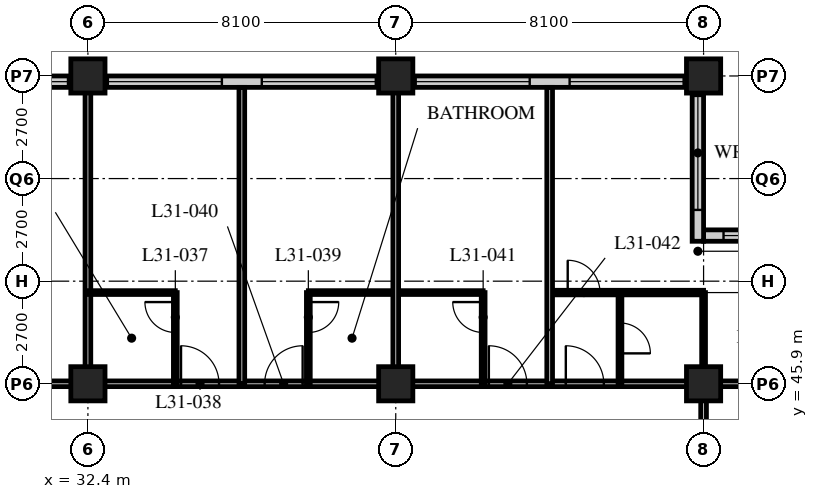
"""IFC4 building model, lengths in metres.
Left out: names, types, materials, properties, quantities, classifications, styles, units other than length and angle.
Written with IfcOpenShell. Run it as: python <this file> out.ifc"""

import sys

from ifc_helpers import new_model, si_unit, direction, frame, frame_2d, origin, origin_2d, place, context, subcontext, project, spatial, rectangle, hollow_rectangle, extrude, element, fill, save


model = new_model("IFC4")
c1 = context("Model", 3, precision=1e-05, world=origin(), true_north=direction((0.0, 1.0)))
c2 = subcontext(c1, "Body", "Model", "MODEL_VIEW")
j1 = project(units=[si_unit("LENGTHUNIT", "METRE"), si_unit("PLANEANGLEUNIT", "RADIAN")], contexts=[c1])
p1 = place(None, origin())
s1 = spatial("IfcSite", under=j1, at=p1, CompositionType="ELEMENT")
p2 = place(p1, origin())
s2 = spatial("IfcBuilding", under=s1, at=p2, CompositionType="ELEMENT")
p3 = place(p2, frame((0.0, 0.0, 123.8)))
s3 = spatial("IfcBuildingStorey", under=s2, at=p3, CompositionType="ELEMENT", Elevation=123.8)
for number, where, z_axis, x_axis in (
    (1, (32.4, 45.9, 0.0), (0.0, 0.0, 1.0), (1.0, 0.0, 0.0)),
    (2, (32.4, 54.0, 0.0), (0.0, 0.0, 1.0), (1.0, 0.0, 0.0)),
    (3, (40.5, 45.9, 0.0), (0.0, 0.0, 1.0), (1.0, 0.0, 0.0)),
    (4, (40.5, 54.0, 0.0), (0.0, 0.0, 1.0), (1.0, 0.0, 0.0)),
    (5, (48.6, 45.9, 0.0), (0.0, 0.0, 1.0), (1.0, 0.0, 0.0)),
    (6, (48.6, 54.0, 0.0), (0.0, 0.0, 1.0), (1.0, 0.0, 0.0)),
):
    element("IfcColumn", number, at=place(p3, frame(where, z_axis=z_axis, x_axis=x_axis)), inside=s3, PredefinedType="COLUMN", context=c2, shape_type="SweptSolid", body=[
        extrude(hollow_rectangle(XDim=0.9, YDim=0.9, WallThickness=0.09, at=origin_2d()), origin(), (0.0, 0.0, 1.0), 3.4),
    ])
p4 = place(p3, frame((52.35, 49.8, 0.0), z_axis=(0.0, 0.0, 1.0), x_axis=(-1.0, 0.0, 0.0)))
e7 = element("IfcWall", 7, at=p4, inside=s3, PredefinedType="SOLIDWALL", context=c2, shape_type="SweptSolid", body=[
    extrude(rectangle(XDim=3.75, YDim=0.3, at=frame_2d((1.875, 0.0))), origin(), (0.0, 0.0, 1.0), 3.19),
])
p5 = place(p4, frame((0.225, 0.0, 0.9)))
e8 = element("IfcOpeningElement", 8, at=p5, cuts=e7, PredefinedType="OPENING", context=c2, shape_type="SweptSolid", body=[
    extrude(rectangle(XDim=3.0, YDim=1.5, at=frame_2d((1.5, 0.75))), frame((0.0, 0.16, 0.0), z_axis=(0.0, -1.0, 0.0), x_axis=(1.0, 0.0, 0.0)), (0.0, 0.0, 1.0), 0.32),
])
p6 = place(p3, frame((48.45, 49.65, 0.0), z_axis=(0.0, 0.0, 1.0), x_axis=(0.0, 1.0, 0.0)))
e9 = element("IfcWall", 9, at=p6, inside=s3, PredefinedType="SOLIDWALL", context=c2, shape_type="SweptSolid", body=[
    extrude(rectangle(XDim=4.35, YDim=0.3, at=frame_2d((2.175, 0.0))), origin(), (0.0, 0.0, 1.0), 3.19),
])
p7 = place(p6, frame((0.825, 0.0, 0.9)))
e10 = element("IfcOpeningElement", 10, at=p7, cuts=e9, PredefinedType="OPENING", context=c2, shape_type="SweptSolid", body=[
    extrude(rectangle(XDim=3.0, YDim=1.5, at=frame_2d((1.5, 0.75))), frame((0.0, 0.16, 0.0), z_axis=(0.0, -1.0, 0.0), x_axis=(1.0, 0.0, 0.0)), (0.0, 0.0, 1.0), 0.32),
])
p8 = place(p3, frame((48.3, 53.85, 0.0), z_axis=(0.0, 0.0, 1.0), x_axis=(-1.0, 0.0, 0.0)))
e11 = element("IfcWall", 11, at=p8, inside=s3, PredefinedType="SOLIDWALL", context=c2, shape_type="SweptSolid", body=[
    extrude(rectangle(XDim=40.2, YDim=0.3, at=frame_2d((20.1, 0.0))), origin(), (0.0, 0.0, 1.0), 3.19),
])
p9 = place(p8, frame((0.225, 0.0, 0.9)))
e12 = element("IfcOpeningElement", 12, at=p9, cuts=e11, PredefinedType="OPENING", context=c2, shape_type="SweptSolid", body=[
    extrude(rectangle(XDim=3.0, YDim=2.0, at=frame_2d((1.5, 1.0))), frame((0.0, 0.16, 0.0), z_axis=(0.0, -1.0, 0.0), x_axis=(1.0, 0.0, 0.0)), (0.0, 0.0, 1.0), 0.32),
])
p10 = place(p8, frame((4.275, 0.0, 0.9)))
e13 = element("IfcOpeningElement", 13, at=p10, cuts=e11, PredefinedType="OPENING", context=c2, shape_type="SweptSolid", body=[
    extrude(rectangle(XDim=3.0, YDim=2.0, at=frame_2d((1.5, 1.0))), frame((0.0, 0.16, 0.0), z_axis=(0.0, -1.0, 0.0), x_axis=(1.0, 0.0, 0.0)), (0.0, 0.0, 1.0), 0.32),
])
p11 = place(p8, frame((8.325, 0.0, 0.9)))
e14 = element("IfcOpeningElement", 14, at=p11, cuts=e11, PredefinedType="OPENING", context=c2, shape_type="SweptSolid", body=[
    extrude(rectangle(XDim=3.0, YDim=2.0, at=frame_2d((1.5, 1.0))), frame((0.0, 0.16, 0.0), z_axis=(0.0, -1.0, 0.0), x_axis=(1.0, 0.0, 0.0)), (0.0, 0.0, 1.0), 0.32),
])
p12 = place(p8, frame((12.375, 0.0, 0.9)))
e15 = element("IfcOpeningElement", 15, at=p12, cuts=e11, PredefinedType="OPENING", context=c2, shape_type="SweptSolid", body=[
    extrude(rectangle(XDim=3.0, YDim=2.0, at=frame_2d((1.5, 1.0))), frame((0.0, 0.16, 0.0), z_axis=(0.0, -1.0, 0.0), x_axis=(1.0, 0.0, 0.0)), (0.0, 0.0, 1.0), 0.32),
])
p13 = place(p8, frame((16.425, 0.0, 0.9)))
e16 = element("IfcOpeningElement", 16, at=p13, cuts=e11, PredefinedType="OPENING", context=c2, shape_type="SweptSolid", body=[
    extrude(rectangle(XDim=3.0, YDim=2.0, at=frame_2d((1.5, 1.0))), frame((0.0, 0.16, 0.0), z_axis=(0.0, -1.0, 0.0), x_axis=(1.0, 0.0, 0.0)), (0.0, 0.0, 1.0), 0.32),
])
p14 = place(p8, frame((20.475, 0.0, 0.9)))
e17 = element("IfcOpeningElement", 17, at=p14, cuts=e11, PredefinedType="OPENING", context=c2, shape_type="SweptSolid", body=[
    extrude(rectangle(XDim=3.0, YDim=2.0, at=frame_2d((1.5, 1.0))), frame((0.0, 0.16, 0.0), z_axis=(0.0, -1.0, 0.0), x_axis=(1.0, 0.0, 0.0)), (0.0, 0.0, 1.0), 0.32),
])
p15 = place(p8, frame((24.525, 0.0, 0.9)))
e18 = element("IfcOpeningElement", 18, at=p15, cuts=e11, PredefinedType="OPENING", context=c2, shape_type="SweptSolid", body=[
    extrude(rectangle(XDim=3.0, YDim=2.0, at=frame_2d((1.5, 1.0))), frame((0.0, 0.16, 0.0), z_axis=(0.0, -1.0, 0.0), x_axis=(1.0, 0.0, 0.0)), (0.0, 0.0, 1.0), 0.32),
])
p16 = place(p8, frame((28.575, 0.0, 0.9)))
e19 = element("IfcOpeningElement", 19, at=p16, cuts=e11, PredefinedType="OPENING", context=c2, shape_type="SweptSolid", body=[
    extrude(rectangle(XDim=3.0, YDim=2.0, at=frame_2d((1.5, 1.0))), frame((0.0, 0.16, 0.0), z_axis=(0.0, -1.0, 0.0), x_axis=(1.0, 0.0, 0.0)), (0.0, 0.0, 1.0), 0.32),
])
p17 = place(p8, frame((32.625, 0.0, 0.9)))
e20 = element("IfcOpeningElement", 20, at=p17, cuts=e11, PredefinedType="OPENING", context=c2, shape_type="SweptSolid", body=[
    extrude(rectangle(XDim=3.0, YDim=2.0, at=frame_2d((1.5, 1.0))), frame((0.0, 0.16, 0.0), z_axis=(0.0, -1.0, 0.0), x_axis=(1.0, 0.0, 0.0)), (0.0, 0.0, 1.0), 0.32),
])
p18 = place(p8, frame((36.675, 0.0, 0.9)))
e21 = element("IfcOpeningElement", 21, at=p18, cuts=e11, PredefinedType="OPENING", context=c2, shape_type="SweptSolid", body=[
    extrude(rectangle(XDim=3.0, YDim=2.0, at=frame_2d((1.5, 1.0))), frame((0.0, 0.16, 0.0), z_axis=(0.0, -1.0, 0.0), x_axis=(1.0, 0.0, 0.0)), (0.0, 0.0, 1.0), 0.32),
])
p19 = place(p3, frame((8.1, 45.9, 0.0), z_axis=(0.0, 0.0, 1.0), x_axis=(1.0, 0.0, 0.0)))
e22 = element("IfcWall", 22, at=p19, inside=s3, PredefinedType="PARTITIONING", context=c2, shape_type="SweptSolid", body=[
    extrude(rectangle(XDim=40.5, YDim=0.15, at=frame_2d((20.25, 0.0))), origin(), (0.0, 0.0, 1.0), 2.578),
])
p20 = place(p19, frame((9.625, 0.0, 0.0)))
e23 = element("IfcOpeningElement", 23, at=p20, cuts=e22, PredefinedType="OPENING", context=c2, shape_type="SweptSolid", body=[
    extrude(rectangle(XDim=1.0, YDim=2.1, at=frame_2d((0.5, 1.05))), frame((0.0, 0.085, 0.0), z_axis=(0.0, -1.0, 0.0), x_axis=(1.0, 0.0, 0.0)), (0.0, 0.0, 1.0), 0.17),
])
p21 = place(p19, frame((21.65, 0.0, 0.0)))
e24 = element("IfcOpeningElement", 24, at=p21, cuts=e22, PredefinedType="OPENING", context=c2, shape_type="SweptSolid", body=[
    extrude(rectangle(XDim=1.0, YDim=2.1, at=frame_2d((0.5, 1.05))), frame((0.0, 0.085, 0.0), z_axis=(0.0, -1.0, 0.0), x_axis=(1.0, 0.0, 0.0)), (0.0, 0.0, 1.0), 0.17),
])
p22 = place(p19, frame((26.75, 0.0, 0.0)))
e25 = element("IfcOpeningElement", 25, at=p22, cuts=e22, PredefinedType="OPENING", context=c2, shape_type="SweptSolid", body=[
    extrude(rectangle(XDim=1.0, YDim=2.1, at=frame_2d((0.5, 1.05))), frame((0.0, 0.085, 0.0), z_axis=(0.0, -1.0, 0.0), x_axis=(1.0, 0.0, 0.0)), (0.0, 0.0, 1.0), 0.17),
])
p23 = place(p19, frame((28.95, 0.0, 0.0)))
e26 = element("IfcOpeningElement", 26, at=p23, cuts=e22, PredefinedType="OPENING", context=c2, shape_type="SweptSolid", body=[
    extrude(rectangle(XDim=1.0, YDim=2.1, at=frame_2d((0.5, 1.05))), frame((0.0, 0.085, 0.0), z_axis=(0.0, -1.0, 0.0), x_axis=(1.0, 0.0, 0.0)), (0.0, 0.0, 1.0), 0.17),
])
p24 = place(p19, frame((34.85, 0.0, 0.0)))
e27 = element("IfcOpeningElement", 27, at=p24, cuts=e22, PredefinedType="OPENING", context=c2, shape_type="SweptSolid", body=[
    extrude(rectangle(XDim=1.0, YDim=2.1, at=frame_2d((0.5, 1.05))), frame((0.0, 0.085, 0.0), z_axis=(0.0, -1.0, 0.0), x_axis=(1.0, 0.0, 0.0)), (0.0, 0.0, 1.0), 0.17),
])
p25 = place(p19, frame((36.875, 0.0, 0.0)))
e28 = element("IfcOpeningElement", 28, at=p25, cuts=e22, PredefinedType="OPENING", context=c2, shape_type="SweptSolid", body=[
    extrude(rectangle(XDim=1.0, YDim=2.1, at=frame_2d((0.5, 1.05))), frame((0.0, 0.085, 0.0), z_axis=(0.0, -1.0, 0.0), x_axis=(1.0, 0.0, 0.0)), (0.0, 0.0, 1.0), 0.17),
])
p26 = place(p19, frame((2.625, 0.0, 0.0)))
e29 = element("IfcOpeningElement", 29, at=p26, cuts=e22, PredefinedType="OPENING", context=c2, shape_type="SweptSolid", body=[
    extrude(rectangle(XDim=1.0, YDim=2.1, at=frame_2d((0.5, 1.05))), frame((0.0, 0.085, 0.0), z_axis=(0.0, -1.0, 0.0), x_axis=(1.0, 0.0, 0.0)), (0.0, 0.0, 1.0), 0.17),
])
p27 = place(p3, frame((48.6, 21.6, 0.0), z_axis=(0.0, 0.0, 1.0), x_axis=(0.0, 1.0, 0.0)))
e30 = element("IfcWall", 30, at=p27, inside=s3, PredefinedType="PARTITIONING", context=c2, shape_type="SweptSolid", body=[
    extrude(rectangle(XDim=24.3, YDim=0.15, at=frame_2d((12.15, 0.0))), origin(), (0.0, 0.0, 1.0), 2.578),
])
p28 = place(p27, frame((2.75, 0.0, 0.0)))
e31 = element("IfcOpeningElement", 31, at=p28, cuts=e30, PredefinedType="OPENING", context=c2, shape_type="SweptSolid", body=[
    extrude(rectangle(XDim=1.0, YDim=2.1, at=frame_2d((0.5, 1.05))), frame((0.0, 0.085, 0.0), z_axis=(0.0, -1.0, 0.0), x_axis=(1.0, 0.0, 0.0)), (0.0, 0.0, 1.0), 0.17),
])
p29 = place(p27, frame((4.65, 0.0, 0.0)))
e32 = element("IfcOpeningElement", 32, at=p29, cuts=e30, PredefinedType="OPENING", context=c2, shape_type="SweptSolid", body=[
    extrude(rectangle(XDim=1.0, YDim=2.1, at=frame_2d((0.5, 1.05))), frame((0.0, 0.085, 0.0), z_axis=(0.0, -1.0, 0.0), x_axis=(1.0, 0.0, 0.0)), (0.0, 0.0, 1.0), 0.17),
])
p30 = place(p27, frame((10.0, 0.0, 0.0)))
e33 = element("IfcOpeningElement", 33, at=p30, cuts=e30, PredefinedType="OPENING", context=c2, shape_type="SweptSolid", body=[
    extrude(rectangle(XDim=1.0, YDim=2.1, at=frame_2d((0.5, 1.05))), frame((0.0, 0.085, 0.0), z_axis=(0.0, -1.0, 0.0), x_axis=(1.0, 0.0, 0.0)), (0.0, 0.0, 1.0), 0.17),
])
p31 = place(p27, frame((18.1, 0.0, 0.0)))
e34 = element("IfcOpeningElement", 34, at=p31, cuts=e30, PredefinedType="OPENING", context=c2, shape_type="SweptSolid", body=[
    extrude(rectangle(XDim=1.0, YDim=2.1, at=frame_2d((0.5, 1.05))), frame((0.0, 0.085, 0.0), z_axis=(0.0, -1.0, 0.0), x_axis=(1.0, 0.0, 0.0)), (0.0, 0.0, 1.0), 0.17),
])
p32 = place(p3, frame((32.4, 45.9, 0.0), z_axis=(0.0, 0.0, 1.0), x_axis=(0.0, 1.0, 0.0)))
e35 = element("IfcWall", 35, at=p32, inside=s3, PredefinedType="PARTITIONING", context=c2, shape_type="SweptSolid", body=[
    extrude(rectangle(XDim=7.8, YDim=0.15, at=frame_2d((3.9, 0.0))), origin(), (0.0, 0.0, 1.0), 2.578),
])
p33 = place(p3, frame((32.4, 48.3, 0.0), z_axis=(0.0, 0.0, 1.0), x_axis=(1.0, 0.0, 0.0)))
e36 = element("IfcWall", 36, at=p33, inside=s3, PredefinedType="PARTITIONING", context=c2, shape_type="SweptSolid", body=[
    extrude(rectangle(XDim=2.3, YDim=0.1, at=frame_2d((1.15, 0.0))), origin(), (0.0, 0.0, 1.0), 3.19),
])
p34 = place(p3, frame((34.7, 45.9, 0.0), z_axis=(0.0, 0.0, 1.0), x_axis=(0.0, 1.0, 0.0)))
e37 = element("IfcWall", 37, at=p34, inside=s3, PredefinedType="PARTITIONING", context=c2, shape_type="SweptSolid", body=[
    extrude(rectangle(XDim=2.4, YDim=0.1, at=frame_2d((1.2, 0.0))), origin(), (0.0, 0.0, 1.0), 3.19),
])
p35 = place(p34, frame((1.35, 0.0, 0.0)))
e38 = element("IfcOpeningElement", 38, at=p35, cuts=e37, PredefinedType="OPENING", context=c2, shape_type="SweptSolid", body=[
    extrude(rectangle(XDim=0.8, YDim=2.1, at=frame_2d((0.4, 1.05))), frame((0.0, 0.06, 0.0), z_axis=(0.0, -1.0, 0.0), x_axis=(1.0, 0.0, 0.0)), (0.0, 0.0, 1.0), 0.12),
])
p36 = place(p3, frame((36.45, 45.9, 0.0), z_axis=(0.0, 0.0, 1.0), x_axis=(0.0, 1.0, 0.0)))
e39 = element("IfcWall", 39, at=p36, inside=s3, PredefinedType="PARTITIONING", context=c2, shape_type="SweptSolid", body=[
    extrude(rectangle(XDim=7.8, YDim=0.15, at=frame_2d((3.9, 0.0))), origin(), (0.0, 0.0, 1.0), 3.19),
])
p37 = place(p3, frame((38.2, 48.3, 0.0), z_axis=(0.0, 0.0, 1.0), x_axis=(1.0, 0.0, 0.0)))
e40 = element("IfcWall", 40, at=p37, inside=s3, PredefinedType="PARTITIONING", context=c2, shape_type="SweptSolid", body=[
    extrude(rectangle(XDim=4.6, YDim=0.1, at=frame_2d((2.3, 0.0))), origin(), (0.0, 0.0, 1.0), 3.19),
])
p38 = place(p3, frame((38.2, 45.9, 0.0), z_axis=(0.0, 0.0, 1.0), x_axis=(0.0, 1.0, 0.0)))
e41 = element("IfcWall", 41, at=p38, inside=s3, PredefinedType="PARTITIONING", context=c2, shape_type="SweptSolid", body=[
    extrude(rectangle(XDim=2.4, YDim=0.1, at=frame_2d((1.2, 0.0))), origin(), (0.0, 0.0, 1.0), 3.19),
])
p39 = place(p38, frame((1.35, 0.0, 0.0)))
e42 = element("IfcOpeningElement", 42, at=p39, cuts=e41, PredefinedType="OPENING", context=c2, shape_type="SweptSolid", body=[
    extrude(rectangle(XDim=0.8, YDim=2.1, at=frame_2d((0.4, 1.05))), frame((0.0, 0.06, 0.0), z_axis=(0.0, -1.0, 0.0), x_axis=(1.0, 0.0, 0.0)), (0.0, 0.0, 1.0), 0.12),
])
p40 = place(p3, frame((40.5, 45.9, 0.0), z_axis=(0.0, 0.0, 1.0), x_axis=(0.0, 1.0, 0.0)))
e43 = element("IfcWall", 43, at=p40, inside=s3, PredefinedType="PARTITIONING", context=c2, shape_type="SweptSolid", body=[
    extrude(rectangle(XDim=7.8, YDim=0.15, at=frame_2d((3.9, 0.0))), origin(), (0.0, 0.0, 1.0), 2.578),
])
p41 = place(p3, frame((42.8, 45.9, 0.0), z_axis=(0.0, 0.0, 1.0), x_axis=(0.0, 1.0, 0.0)))
e44 = element("IfcWall", 44, at=p41, inside=s3, PredefinedType="PARTITIONING", context=c2, shape_type="SweptSolid", body=[
    extrude(rectangle(XDim=2.4, YDim=0.1, at=frame_2d((1.2, 0.0))), origin(), (0.0, 0.0, 1.0), 3.19),
])
p42 = place(p41, frame((1.35, 0.0, 0.0)))
e45 = element("IfcOpeningElement", 45, at=p42, cuts=e44, PredefinedType="OPENING", context=c2, shape_type="SweptSolid", body=[
    extrude(rectangle(XDim=0.8, YDim=2.1, at=frame_2d((0.4, 1.05))), frame((0.0, 0.06, 0.0), z_axis=(0.0, -1.0, 0.0), x_axis=(1.0, 0.0, 0.0)), (0.0, 0.0, 1.0), 0.12),
])
p43 = place(p3, frame((44.55, 48.3, 0.0), z_axis=(0.0, 0.0, 1.0), x_axis=(1.0, 0.0, 0.0)))
e46 = element("IfcWall", 46, at=p43, inside=s3, PredefinedType="PARTITIONING", context=c2, shape_type="SweptSolid", body=[
    extrude(rectangle(XDim=4.05, YDim=0.12, at=frame_2d((2.025, 0.0))), origin(), (0.0, 0.0, 1.0), 3.19),
])
p44 = place(p43, frame((0.475, 0.0, 0.0)))
e47 = element("IfcOpeningElement", 47, at=p44, cuts=e46, PredefinedType="OPENING", context=c2, shape_type="SweptSolid", body=[
    extrude(rectangle(XDim=0.85, YDim=2.1, at=frame_2d((0.425, 1.05))), frame((0.0, 0.07, 0.0), z_axis=(0.0, -1.0, 0.0), x_axis=(1.0, 0.0, 0.0)), (0.0, 0.0, 1.0), 0.14),
])
p45 = place(p3, frame((46.4, 45.9, 0.0), z_axis=(0.0, 0.0, 1.0), x_axis=(0.0, 1.0, 0.0)))
e48 = element("IfcWall", 48, at=p45, inside=s3, PredefinedType="PARTITIONING", context=c2, shape_type="SweptSolid", body=[
    extrude(rectangle(XDim=2.4, YDim=0.1, at=frame_2d((1.2, 0.0))), origin(), (0.0, 0.0, 1.0), 3.19),
])
p46 = place(p45, frame((0.8, 0.0, 0.0)))
e49 = element("IfcOpeningElement", 49, at=p46, cuts=e48, PredefinedType="OPENING", context=c2, shape_type="SweptSolid", body=[
    extrude(rectangle(XDim=0.8, YDim=2.1, at=frame_2d((0.4, 1.05))), frame((0.0, 0.06, 0.0), z_axis=(0.0, -1.0, 0.0), x_axis=(1.0, 0.0, 0.0)), (0.0, 0.0, 1.0), 0.12),
])
p47 = place(p3, frame((48.6, 45.9, 0.0), z_axis=(0.0, 0.0, 1.0), x_axis=(0.0, 1.0, 0.0)))
e50 = element("IfcWall", 50, at=p47, inside=s3, PredefinedType="PARTITIONING", context=c2, shape_type="SweptSolid", body=[
    extrude(rectangle(XDim=2.4, YDim=0.1, at=frame_2d((1.2, 0.0))), origin(), (0.0, 0.0, 1.0), 2.578),
])
p48 = place(p3, frame((48.6, 45.9, 0.0), z_axis=(0.0, 0.0, 1.0), x_axis=(1.0, 0.0, 0.0)))
e51 = element("IfcWall", 51, at=p48, inside=s3, PredefinedType="PARTITIONING", context=c2, shape_type="SweptSolid", body=[
    extrude(rectangle(XDim=3.75, YDim=0.15, at=frame_2d((1.875, 0.0))), origin(), (0.0, 0.0, 1.0), 2.578),
])
p49 = place(p3, frame((44.55, 45.9, 0.0), z_axis=(0.0, 0.0, 1.0), x_axis=(0.0, 1.0, 0.0)))
e52 = element("IfcWall", 52, at=p49, inside=s3, PredefinedType="PARTITIONING", context=c2, shape_type="SweptSolid", body=[
    extrude(rectangle(XDim=7.8, YDim=0.15, at=frame_2d((3.9, 0.0))), origin(), (0.0, 0.0, 1.0), 3.19),
])
p50 = place(p5, origin())
e53 = element("IfcWindow", 53, at=p50, inside=s3, PartitioningType="SINGLE_PANEL", PredefinedType="WINDOW", context=c2, shape_type="SweptSolid", body=[
    extrude(rectangle(XDim=3.0, YDim=1.5, at=frame_2d((1.5, 0.75))), frame((0.0, 0.03, 0.0), z_axis=(0.0, -1.0, 0.0), x_axis=(1.0, 0.0, 0.0)), (0.0, 0.0, 1.0), 0.06),
])
fill(e8, e53)
p51 = place(p7, origin())
e54 = element("IfcWindow", 54, at=p51, inside=s3, PartitioningType="SINGLE_PANEL", PredefinedType="WINDOW", context=c2, shape_type="SweptSolid", body=[
    extrude(rectangle(XDim=3.0, YDim=1.5, at=frame_2d((1.5, 0.75))), frame((0.0, 0.03, 0.0), z_axis=(0.0, -1.0, 0.0), x_axis=(1.0, 0.0, 0.0)), (0.0, 0.0, 1.0), 0.06),
])
fill(e10, e54)
p52 = place(p9, origin())
e55 = element("IfcWindow", 55, at=p52, inside=s3, PartitioningType="SINGLE_PANEL", PredefinedType="WINDOW", context=c2, shape_type="SweptSolid", body=[
    extrude(rectangle(XDim=3.0, YDim=2.0, at=frame_2d((1.5, 1.0))), frame((0.0, 0.03, 0.0), z_axis=(0.0, -1.0, 0.0), x_axis=(1.0, 0.0, 0.0)), (0.0, 0.0, 1.0), 0.06),
])
fill(e12, e55)
p53 = place(p10, origin())
e56 = element("IfcWindow", 56, at=p53, inside=s3, PartitioningType="SINGLE_PANEL", PredefinedType="WINDOW", context=c2, shape_type="SweptSolid", body=[
    extrude(rectangle(XDim=3.0, YDim=2.0, at=frame_2d((1.5, 1.0))), frame((0.0, 0.03, 0.0), z_axis=(0.0, -1.0, 0.0), x_axis=(1.0, 0.0, 0.0)), (0.0, 0.0, 1.0), 0.06),
])
fill(e13, e56)
p54 = place(p11, origin())
e57 = element("IfcWindow", 57, at=p54, inside=s3, PartitioningType="SINGLE_PANEL", PredefinedType="WINDOW", context=c2, shape_type="SweptSolid", body=[
    extrude(rectangle(XDim=3.0, YDim=2.0, at=frame_2d((1.5, 1.0))), frame((0.0, 0.03, 0.0), z_axis=(0.0, -1.0, 0.0), x_axis=(1.0, 0.0, 0.0)), (0.0, 0.0, 1.0), 0.06),
])
fill(e14, e57)
p55 = place(p12, origin())
e58 = element("IfcWindow", 58, at=p55, inside=s3, PartitioningType="SINGLE_PANEL", PredefinedType="WINDOW", context=c2, shape_type="SweptSolid", body=[
    extrude(rectangle(XDim=3.0, YDim=2.0, at=frame_2d((1.5, 1.0))), frame((0.0, 0.03, 0.0), z_axis=(0.0, -1.0, 0.0), x_axis=(1.0, 0.0, 0.0)), (0.0, 0.0, 1.0), 0.06),
])
fill(e15, e58)
p56 = place(p13, origin())
e59 = element("IfcWindow", 59, at=p56, inside=s3, PartitioningType="SINGLE_PANEL", PredefinedType="WINDOW", context=c2, shape_type="SweptSolid", body=[
    extrude(rectangle(XDim=3.0, YDim=2.0, at=frame_2d((1.5, 1.0))), frame((0.0, 0.03, 0.0), z_axis=(0.0, -1.0, 0.0), x_axis=(1.0, 0.0, 0.0)), (0.0, 0.0, 1.0), 0.06),
])
fill(e16, e59)
p57 = place(p35, origin())
e60 = element("IfcDoor", 60, at=p57, inside=s3, OperationType="SINGLE_SWING_RIGHT", PredefinedType="DOOR", context=c2, shape_type="SweptSolid", body=[
    extrude(rectangle(XDim=0.8, YDim=2.1, at=frame_2d((0.4, 1.05))), frame((0.0, 0.025, 0.0), z_axis=(0.0, -1.0, 0.0), x_axis=(1.0, 0.0, 0.0)), (0.0, 0.0, 1.0), 0.05),
])
fill(e38, e60)
p58 = place(p22, origin())
e61 = element("IfcDoor", 61, at=p58, inside=s3, OperationType="SINGLE_SWING_LEFT", PredefinedType="DOOR", context=c2, shape_type="SweptSolid", body=[
    extrude(rectangle(XDim=1.0, YDim=2.1, at=frame_2d((0.5, 1.05))), frame((0.0, 0.025, 0.0), z_axis=(0.0, -1.0, 0.0), x_axis=(1.0, 0.0, 0.0)), (0.0, 0.0, 1.0), 0.05),
])
fill(e25, e61)
p59 = place(p39, origin())
e62 = element("IfcDoor", 62, at=p59, inside=s3, OperationType="SINGLE_SWING_LEFT", PredefinedType="DOOR", context=c2, shape_type="SweptSolid", body=[
    extrude(rectangle(XDim=0.8, YDim=2.1, at=frame_2d((0.4, 1.05))), frame((0.0, 0.025, 0.0), z_axis=(0.0, -1.0, 0.0), x_axis=(1.0, 0.0, 0.0)), (0.0, 0.0, 1.0), 0.05),
])
fill(e42, e62)
p60 = place(p23, origin())
e63 = element("IfcDoor", 63, at=p60, inside=s3, OperationType="SINGLE_SWING_RIGHT", PredefinedType="DOOR", context=c2, shape_type="SweptSolid", body=[
    extrude(rectangle(XDim=1.0, YDim=2.1, at=frame_2d((0.5, 1.05))), frame((0.0, 0.025, 0.0), z_axis=(0.0, -1.0, 0.0), x_axis=(1.0, 0.0, 0.0)), (0.0, 0.0, 1.0), 0.05),
])
fill(e26, e63)
p61 = place(p42, origin())
e64 = element("IfcDoor", 64, at=p61, inside=s3, OperationType="SINGLE_SWING_RIGHT", PredefinedType="DOOR", context=c2, shape_type="SweptSolid", body=[
    extrude(rectangle(XDim=0.8, YDim=2.1, at=frame_2d((0.4, 1.05))), frame((0.0, 0.025, 0.0), z_axis=(0.0, -1.0, 0.0), x_axis=(1.0, 0.0, 0.0)), (0.0, 0.0, 1.0), 0.05),
])
fill(e45, e64)
p62 = place(p24, origin())
e65 = element("IfcDoor", 65, at=p62, inside=s3, OperationType="SINGLE_SWING_LEFT", PredefinedType="DOOR", context=c2, shape_type="SweptSolid", body=[
    extrude(rectangle(XDim=1.0, YDim=2.1, at=frame_2d((0.5, 1.05))), frame((0.0, 0.025, 0.0), z_axis=(0.0, -1.0, 0.0), x_axis=(1.0, 0.0, 0.0)), (0.0, 0.0, 1.0), 0.05),
])
fill(e27, e65)
p63 = place(p46, origin())
e66 = element("IfcDoor", 66, at=p63, inside=s3, OperationType="SINGLE_SWING_RIGHT", PredefinedType="DOOR", context=c2, shape_type="SweptSolid", body=[
    extrude(rectangle(XDim=0.8, YDim=2.1, at=frame_2d((0.4, 1.05))), frame((0.0, 0.025, 0.0), z_axis=(0.0, -1.0, 0.0), x_axis=(1.0, 0.0, 0.0)), (0.0, 0.0, 1.0), 0.05),
])
fill(e49, e66)
p64 = place(p25, origin())
e67 = element("IfcDoor", 67, at=p64, inside=s3, OperationType="SINGLE_SWING_LEFT", PredefinedType="DOOR", context=c2, shape_type="SweptSolid", body=[
    extrude(rectangle(XDim=1.0, YDim=2.1, at=frame_2d((0.5, 1.05))), frame((0.0, 0.025, 0.0), z_axis=(0.0, -1.0, 0.0), x_axis=(1.0, 0.0, 0.0)), (0.0, 0.0, 1.0), 0.05),
])
fill(e28, e67)
p65 = place(p44, origin())
e68 = element("IfcDoor", 68, at=p65, inside=s3, OperationType="SINGLE_SWING_LEFT", PredefinedType="DOOR", context=c2, shape_type="SweptSolid", body=[
    extrude(rectangle(XDim=0.85, YDim=2.1, at=frame_2d((0.425, 1.05))), frame((0.0, 0.025, 0.0), z_axis=(0.0, -1.0, 0.0), x_axis=(1.0, 0.0, 0.0)), (0.0, 0.0, 1.0), 0.05),
])
fill(e47, e68)
save(model, sys.argv[1])
